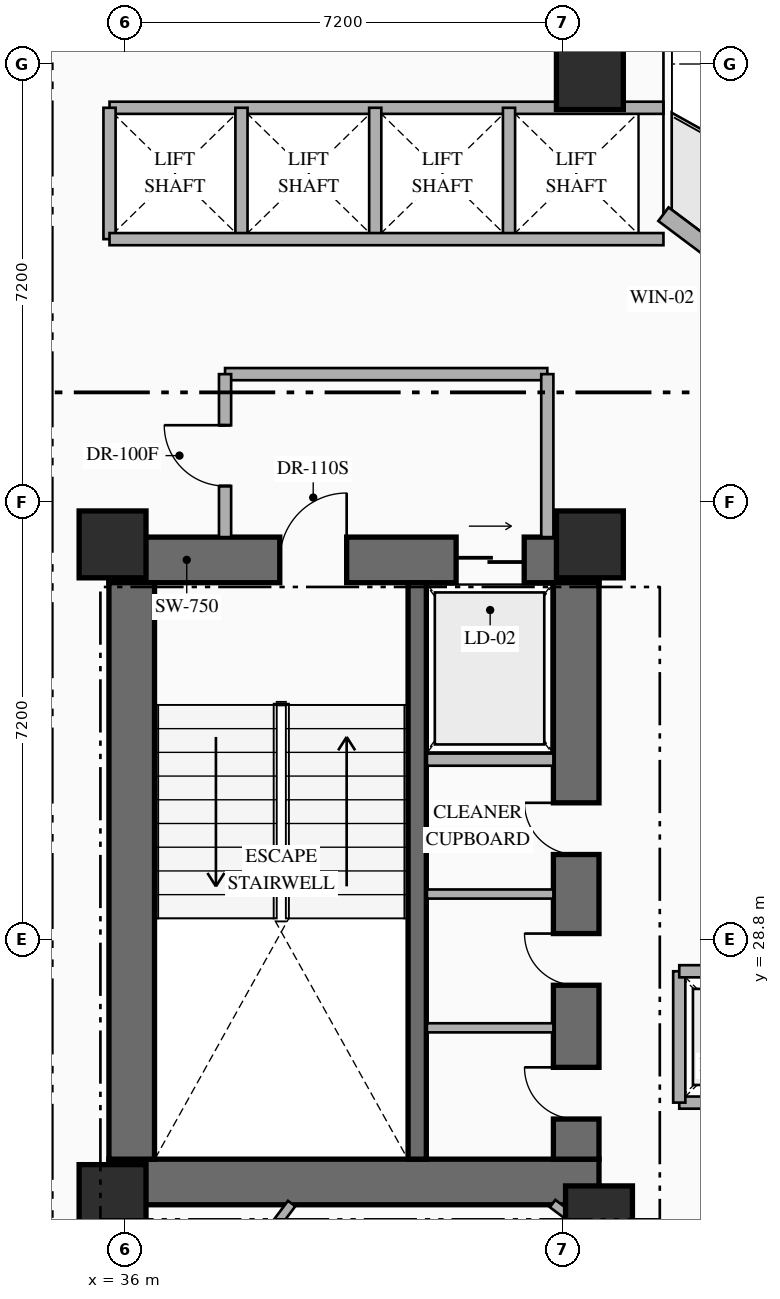
"""IFC4 building model, lengths in metres.
Left out: names, types, materials, properties, quantities, classifications, styles, units other than length and angle.
Written with IfcOpenShell. Run it as: python <this file> out.ifc"""

import sys

from ifc_helpers import new_model, si_unit, direction, frame, frame_2d, origin, origin_2d, place, context, subcontext, project, spatial, rectangle, extrude, element, fill, save


model = new_model("IFC4")
c1 = context("Model", 3, precision=1e-05, world=origin(), true_north=direction((0.0, 1.0)))
c2 = subcontext(c1, "Body", "Model", "MODEL_VIEW")
j1 = project(units=[si_unit("LENGTHUNIT", "METRE"), si_unit("PLANEANGLEUNIT", "RADIAN")], contexts=[c1])
p1 = place(None, origin())
s1 = spatial("IfcSite", under=j1, at=p1, CompositionType="ELEMENT")
p2 = place(p1, origin())
s2 = spatial("IfcBuilding", under=s1, at=p2, CompositionType="ELEMENT")
p3 = place(p2, frame((0.0, 0.0, 50.0)))
s3 = spatial("IfcBuildingStorey", under=s2, at=p3, CompositionType="ELEMENT", Elevation=50.0)
p4 = place(p3, frame((35.74, 24.815, 0.0), z_axis=(0.0, 0.0, 1.0), x_axis=(1.0, 0.0, 0.0)))
e1 = element("IfcWall", 1, at=p4, inside=s3, PredefinedType="SHEAR", context=c2, shape_type="SweptSolid", body=[
    extrude(rectangle(XDim=8.06, YDim=0.75, at=frame_2d((4.03, 0.0))), origin(), (0.0, 0.0, 1.0), 3.35),
])
p5 = place(p3, frame((35.74, 35.045, 0.0), z_axis=(0.0, 0.0, 1.0), x_axis=(1.0, 0.0, 0.0)))
e2 = element("IfcWall", 2, at=p5, inside=s3, PredefinedType="SHEAR", context=c2, shape_type="SweptSolid", body=[
    extrude(rectangle(XDim=8.06, YDim=0.75, at=frame_2d((4.03, 0.0))), origin(), (0.0, 0.0, 1.0), 3.35),
])
p6 = place(p5, frame((2.81, 0.0, 0.0)))
e3 = element("IfcOpeningElement", 3, at=p6, cuts=e2, PredefinedType="OPENING", context=c2, shape_type="SweptSolid", body=[
    extrude(rectangle(XDim=1.1, YDim=2.2, at=frame_2d((0.55, 1.1))), frame((0.0, 0.385, 0.0), z_axis=(0.0, -1.0, 0.0), x_axis=(1.0, 0.0, 0.0)), (0.0, 0.0, 1.0), 0.77),
])
p7 = place(p5, frame((5.71, 0.0, 0.0)))
e4 = element("IfcOpeningElement", 4, at=p7, cuts=e2, PredefinedType="OPENING", context=c2, shape_type="SweptSolid", body=[
    extrude(rectangle(XDim=1.12, YDim=2.15, at=frame_2d((0.56, 1.075))), frame((0.0, 0.385, 0.0), z_axis=(0.0, -1.0, 0.0), x_axis=(1.0, 0.0, 0.0)), (0.0, 0.0, 1.0), 0.77),
])
p8 = place(p3, frame((36.115, 25.19, 0.0), z_axis=(0.0, 0.0, 1.0), x_axis=(0.0, 1.0, 0.0)))
e5 = element("IfcWall", 5, at=p8, inside=s3, PredefinedType="SHEAR", context=c2, shape_type="SweptSolid", body=[
    extrude(rectangle(XDim=9.48, YDim=0.75, at=frame_2d((4.74, 0.0))), origin(), (0.0, 0.0, 1.0), 3.35),
])
p9 = place(p3, frame((43.425, 25.19, 0.0), z_axis=(0.0, 0.0, 1.0), x_axis=(0.0, 1.0, 0.0)))
e6 = element("IfcWall", 6, at=p9, inside=s3, PredefinedType="SHEAR", context=c2, shape_type="SweptSolid", body=[
    extrude(rectangle(XDim=9.48, YDim=0.75, at=frame_2d((4.74, 0.0))), origin(), (0.0, 0.0, 1.0), 3.35),
])
p10 = place(p9, frame((0.66, 0.0, 0.0)))
e7 = element("IfcOpeningElement", 7, at=p10, cuts=e6, PredefinedType="OPENING", context=c2, shape_type="SweptSolid", body=[
    extrude(rectangle(XDim=0.85, YDim=2.08, at=frame_2d((0.425, 1.04))), frame((0.0, 0.385, 0.0), z_axis=(0.0, -1.0, 0.0), x_axis=(1.0, 0.0, 0.0)), (0.0, 0.0, 1.0), 0.77),
])
p11 = place(p9, frame((2.86, 0.0, 0.0)))
e8 = element("IfcOpeningElement", 8, at=p11, cuts=e6, PredefinedType="OPENING", context=c2, shape_type="SweptSolid", body=[
    extrude(rectangle(XDim=0.85, YDim=2.08, at=frame_2d((0.425, 1.04))), frame((0.0, 0.385, 0.0), z_axis=(0.0, -1.0, 0.0), x_axis=(1.0, 0.0, 0.0)), (0.0, 0.0, 1.0), 0.77),
])
p12 = place(p9, frame((5.01, 0.0, 0.0)))
e9 = element("IfcOpeningElement", 9, at=p12, cuts=e6, PredefinedType="OPENING", context=c2, shape_type="SweptSolid", body=[
    extrude(rectangle(XDim=0.85, YDim=2.08, at=frame_2d((0.425, 1.04))), frame((0.0, 0.385, 0.0), z_axis=(0.0, -1.0, 0.0), x_axis=(1.0, 0.0, 0.0)), (0.0, 0.0, 1.0), 0.77),
])
p13 = place(p3, frame((40.81, 25.19, 0.0), z_axis=(0.0, 0.0, 1.0), x_axis=(0.0, 1.0, 0.0)))
e10 = element("IfcWall", 10, at=p13, inside=s3, PredefinedType="SHEAR", context=c2, shape_type="SweptSolid", body=[
    extrude(rectangle(XDim=9.48, YDim=0.3, at=frame_2d((4.74, 0.0))), origin(), (0.0, 0.0, 1.0), 3.35),
])
for number, where, z_axis, x_axis in (
    (11, (35.8, 24.55, 0.0), (0.0, 0.0, 1.0), (1.0, 0.0, 0.0)),
    (12, (43.8, 24.2, 0.0), (0.0, 0.0, 1.0), (1.0, 0.0, 0.0)),
    (13, (35.8, 35.3, 0.0), (0.0, 0.0, 1.0), (1.0, 0.0, 0.0)),
    (14, (43.65, 35.3, 0.0), (0.0, 0.0, 1.0), (1.0, 0.0, 0.0)),
    (15, (43.65, 43.0, 0.0), (0.0, 0.0, 1.0), (1.0, 0.0, 0.0)),
):
    element("IfcColumn", number, at=place(p3, frame(where, z_axis=z_axis, x_axis=x_axis)), inside=s3, PredefinedType="COLUMN", context=c2, shape_type="SweptSolid", body=[
        extrude(rectangle(XDim=1.1, YDim=1.1, at=origin_2d()), origin(), (0.0, 0.0, 1.0), 3.35),
    ])
p14 = place(p3, frame((44.86, 40.73, 0.0), z_axis=(0.0, 0.0, 1.0), x_axis=(0.800006902154, -0.599990797017, 0.0)))
e16 = element("IfcWall", 16, at=p14, inside=s3, PredefinedType="STANDARD", context=c2, shape_type="SweptSolid", body=[
    extrude(rectangle(XDim=29.712, YDim=0.28, at=frame_2d((14.856, 0.0))), origin(), (0.0, 0.0, 1.0), 3.13),
])
p15 = place(p14, frame((14.249, 0.0, 0.0)))
e17 = element("IfcOpeningElement", 17, at=p15, cuts=e16, PredefinedType="OPENING", context=c2, shape_type="SweptSolid", body=[
    extrude(rectangle(XDim=1.1, YDim=2.2, at=frame_2d((0.55, 1.1))), frame((0.0, 0.15, 0.0), z_axis=(0.0, -1.0, 0.0), x_axis=(1.0, 0.0, 0.0)), (0.0, 0.0, 1.0), 0.3),
])
p16 = place(p14, frame((1.612, 0.0, 0.85)))
e18 = element("IfcOpeningElement", 18, at=p16, cuts=e16, PredefinedType="OPENING", context=c2, shape_type="SweptSolid", body=[
    extrude(rectangle(XDim=1.4, YDim=1.8, at=frame_2d((0.7, 0.9))), frame((0.0, 0.15, 0.0), z_axis=(0.0, -1.0, 0.0), x_axis=(1.0, 0.0, 0.0)), (0.0, 0.0, 1.0), 0.3),
])
p17 = place(p14, frame((5.667, 0.0, 0.85)))
e19 = element("IfcOpeningElement", 19, at=p17, cuts=e16, PredefinedType="OPENING", context=c2, shape_type="SweptSolid", body=[
    extrude(rectangle(XDim=1.4, YDim=1.8, at=frame_2d((0.7, 0.9))), frame((0.0, 0.15, 0.0), z_axis=(0.0, -1.0, 0.0), x_axis=(1.0, 0.0, 0.0)), (0.0, 0.0, 1.0), 0.3),
])
p18 = place(p14, frame((9.912, 0.0, 0.85)))
e20 = element("IfcOpeningElement", 20, at=p18, cuts=e16, PredefinedType="OPENING", context=c2, shape_type="SweptSolid", body=[
    extrude(rectangle(XDim=1.4, YDim=1.8, at=frame_2d((0.7, 0.9))), frame((0.0, 0.15, 0.0), z_axis=(0.0, -1.0, 0.0), x_axis=(1.0, 0.0, 0.0)), (0.0, 0.0, 1.0), 0.3),
])
p19 = place(p14, frame((19.528, 0.0, 0.85)))
e21 = element("IfcOpeningElement", 21, at=p19, cuts=e16, PredefinedType="OPENING", context=c2, shape_type="SweptSolid", body=[
    extrude(rectangle(XDim=1.4, YDim=1.8, at=frame_2d((0.7, 0.9))), frame((0.0, 0.15, 0.0), z_axis=(0.0, -1.0, 0.0), x_axis=(1.0, 0.0, 0.0)), (0.0, 0.0, 1.0), 0.3),
])
p20 = place(p14, frame((23.451, 0.0, 0.85)))
e22 = element("IfcOpeningElement", 22, at=p20, cuts=e16, PredefinedType="OPENING", context=c2, shape_type="SweptSolid", body=[
    extrude(rectangle(XDim=1.4, YDim=1.8, at=frame_2d((0.7, 0.9))), frame((0.0, 0.15, 0.0), z_axis=(0.0, -1.0, 0.0), x_axis=(1.0, 0.0, 0.0)), (0.0, 0.0, 1.0), 0.3),
])
p21 = place(p14, frame((27.852, 0.0, 0.85)))
e23 = element("IfcOpeningElement", 23, at=p21, cuts=e16, PredefinedType="OPENING", context=c2, shape_type="SweptSolid", body=[
    extrude(rectangle(XDim=1.4, YDim=1.8, at=frame_2d((0.7, 0.9))), frame((0.0, 0.15, 0.0), z_axis=(0.0, -1.0, 0.0), x_axis=(1.0, 0.0, 0.0)), (0.0, 0.0, 1.0), 0.3),
])
p22 = place(p3, frame((40.97, 31.76, 0.0), z_axis=(0.0, 0.0, 1.0), x_axis=(1.0, 0.0, 0.0)))
e24 = element("IfcWall", 24, at=p22, inside=s3, PredefinedType="STANDARD", context=c2, shape_type="SweptSolid", body=[
    extrude(rectangle(XDim=2.08, YDim=0.2, at=frame_2d((1.04, 0.0))), origin(), (0.0, 0.0, 1.0), 3.13),
])
for number, where, z_axis, x_axis in (
    (25, (40.97, 27.35, 0.0), (0.0, 0.0, 1.0), (1.0, 0.0, 0.0)),
    (26, (40.97, 29.55, 0.0), (0.0, 0.0, 1.0), (1.0, 0.0, 0.0)),
):
    element("IfcWall", number, at=place(p3, frame(where, z_axis=z_axis, x_axis=x_axis)), inside=s3, PredefinedType="PARTITIONING", context=c2, shape_type="SweptSolid", body=[
        extrude(rectangle(XDim=2.08, YDim=0.15, at=frame_2d((1.04, 0.0))), origin(), (0.0, 0.0, 1.0), 3.13),
    ])
p23 = place(p3, frame((37.65, 38.1, 0.0), z_axis=(0.0, 0.0, 1.0), x_axis=(1.0, 0.0, 0.0)))
e27 = element("IfcWall", 27, at=p23, inside=s3, PredefinedType="STANDARD", context=c2, shape_type="SweptSolid", body=[
    extrude(rectangle(XDim=5.3, YDim=0.2, at=frame_2d((2.65, 0.0))), origin(), (0.0, 0.0, 1.0), 3.13),
])
p24 = place(p3, frame((42.95, 35.42, 0.0), z_axis=(0.0, 0.0, 1.0), x_axis=(0.0, 1.0, 0.0)))
e28 = element("IfcWall", 28, at=p24, inside=s3, PredefinedType="STANDARD", context=c2, shape_type="SweptSolid", body=[
    extrude(rectangle(XDim=2.68, YDim=0.2, at=frame_2d((1.34, 0.0))), origin(), (0.0, 0.0, 1.0), 3.13),
])
p25 = place(p3, frame((37.65, 35.42, 0.0), z_axis=(0.0, 0.0, 1.0), x_axis=(0.0, 1.0, 0.0)))
e29 = element("IfcWall", 29, at=p25, inside=s3, PredefinedType="STANDARD", context=c2, shape_type="SweptSolid", body=[
    extrude(rectangle(XDim=2.68, YDim=0.2, at=frame_2d((1.34, 0.0))), origin(), (0.0, 0.0, 1.0), 3.13),
])
p26 = place(p25, frame((0.84, 0.0, 0.0)))
e30 = element("IfcOpeningElement", 30, at=p26, cuts=e29, PredefinedType="OPENING", context=c2, shape_type="SweptSolid", body=[
    extrude(rectangle(XDim=1.0, YDim=2.2, at=frame_2d((0.5, 1.1))), frame((0.0, 0.11, 0.0), z_axis=(0.0, -1.0, 0.0), x_axis=(1.0, 0.0, 0.0)), (0.0, 0.0, 1.0), 0.22),
])
p27 = place(p3, frame((35.75, 42.48, 0.0), z_axis=(0.0, 0.0, 1.0), x_axis=(1.0, 0.0, 0.0)))
e31 = element("IfcWall", 31, at=p27, inside=s3, PredefinedType="STANDARD", context=c2, shape_type="SweptSolid", body=[
    extrude(rectangle(XDim=9.11, YDim=0.2, at=frame_2d((4.555, 0.0))), origin(), (0.0, 0.0, 1.0), 3.13),
])
for number, where, z_axis, x_axis in (
    (32, (35.75, 40.32, 0.0), (0.0, 0.0, 1.0), (0.0, 1.0, 0.0)),
    (33, (37.92, 40.32, 0.0), (0.0, 0.0, 1.0), (0.0, 1.0, 0.0)),
    (34, (40.12, 40.32, 0.0), (0.0, 0.0, 1.0), (0.0, 1.0, 0.0)),
    (35, (42.32, 40.32, 0.0), (0.0, 0.0, 1.0), (0.0, 1.0, 0.0)),
):
    element("IfcWall", number, at=place(p3, frame(where, z_axis=z_axis, x_axis=x_axis)), inside=s3, PredefinedType="STANDARD", context=c2, shape_type="SweptSolid", body=[
        extrude(rectangle(XDim=2.16, YDim=0.2, at=frame_2d((1.08, 0.0))), origin(), (0.0, 0.0, 1.0), 3.13),
    ])
p28 = place(p3, frame((35.75, 40.32, 0.0), z_axis=(0.0, 0.0, 1.0), x_axis=(1.0, 0.0, 0.0)))
e36 = element("IfcWall", 36, at=p28, inside=s3, PredefinedType="STANDARD", context=c2, shape_type="SweptSolid", body=[
    extrude(rectangle(XDim=9.11, YDim=0.2, at=frame_2d((4.555, 0.0))), origin(), (0.0, 0.0, 1.0), 3.13),
])
p29 = place(p3, frame((45.12, 26.12, 0.0), z_axis=(0.0, 0.0, 1.0), x_axis=(1.0, 0.0, 0.0)))
e37 = element("IfcWall", 37, at=p29, inside=s3, PredefinedType="STANDARD", context=c2, shape_type="SweptSolid", body=[
    extrude(rectangle(XDim=4.4, YDim=0.2, at=frame_2d((2.2, 0.0))), origin(), (0.0, 0.0, 1.0), 3.13),
])
p30 = place(p3, frame((45.12, 26.12, 0.0), z_axis=(0.0, 0.0, 1.0), x_axis=(0.0, 1.0, 0.0)))
e38 = element("IfcWall", 38, at=p30, inside=s3, PredefinedType="STANDARD", context=c2, shape_type="SweptSolid", body=[
    extrude(rectangle(XDim=2.16, YDim=0.2, at=frame_2d((1.08, 0.0))), origin(), (0.0, 0.0, 1.0), 3.13),
])
p31 = place(p3, frame((45.12, 28.28, 0.0), z_axis=(0.0, 0.0, 1.0), x_axis=(1.0, 0.0, 0.0)))
e39 = element("IfcWall", 39, at=p31, inside=s3, PredefinedType="STANDARD", context=c2, shape_type="SweptSolid", body=[
    extrude(rectangle(XDim=4.4, YDim=0.2, at=frame_2d((2.2, 0.0))), origin(), (0.0, 0.0, 1.0), 3.13),
])
p32 = place(p31, frame((0.56, 0.0, 0.0)))
e40 = element("IfcOpeningElement", 40, at=p32, cuts=e39, PredefinedType="OPENING", context=c2, shape_type="SweptSolid", body=[
    extrude(rectangle(XDim=1.08, YDim=2.15, at=frame_2d((0.54, 1.075))), frame((0.0, 0.11, 0.0), z_axis=(0.0, -1.0, 0.0), x_axis=(1.0, 0.0, 0.0)), (0.0, 0.0, 1.0), 0.22),
])
p33 = place(p31, frame((2.76, 0.0, 0.0)))
e41 = element("IfcOpeningElement", 41, at=p33, cuts=e39, PredefinedType="OPENING", context=c2, shape_type="SweptSolid", body=[
    extrude(rectangle(XDim=1.08, YDim=2.15, at=frame_2d((0.54, 1.075))), frame((0.0, 0.11, 0.0), z_axis=(0.0, -1.0, 0.0), x_axis=(1.0, 0.0, 0.0)), (0.0, 0.0, 1.0), 0.22),
])
p34 = place(p3, frame((43.037, 24.46, 0.0), z_axis=(0.0, 0.0, 1.0), x_axis=(0.799971872363, -0.600037501685, 0.0)))
e42 = element("IfcWall", 42, at=p34, inside=s3, PredefinedType="PARTITIONING", context=c2, shape_type="SweptSolid", body=[
    extrude(rectangle(XDim=4.167, YDim=0.15, at=frame_2d((2.083, 0.0))), origin(), (0.0, 0.0, 1.0), 2.425),
])
p35 = place(p34, frame((2.468, 0.0, 0.0)))
e43 = element("IfcOpeningElement", 43, at=p35, cuts=e42, PredefinedType="OPENING", context=c2, shape_type="SweptSolid", body=[
    extrude(rectangle(XDim=0.95, YDim=2.15, at=frame_2d((0.475, 1.075))), frame((0.0, 0.085, 0.0), z_axis=(0.0, -1.0, 0.0), x_axis=(1.0, 0.0, 0.0)), (0.0, 0.0, 1.0), 0.17),
])
p36 = place(p3, frame((33.384, 17.312, 0.0), z_axis=(0.0, 0.0, 1.0), x_axis=(0.600008743659, 0.799993442181, 0.0)))
e44 = element("IfcWall", 44, at=p36, inside=s3, PredefinedType="PARTITIONING", context=c2, shape_type="SweptSolid", body=[
    extrude(rectangle(XDim=8.935, YDim=0.15, at=frame_2d((4.468, 0.0))), origin(), (0.0, 0.0, 1.0), 3.13),
])
p37 = place(p6, origin())
e45 = element("IfcDoor", 45, at=p37, inside=s3, OperationType="SINGLE_SWING_RIGHT", PredefinedType="DOOR", context=c2, shape_type="SweptSolid", body=[
    extrude(rectangle(XDim=1.1, YDim=2.2, at=frame_2d((0.55, 1.1))), frame((0.0, 0.025, 0.0), z_axis=(0.0, -1.0, 0.0), x_axis=(1.0, 0.0, 0.0)), (0.0, 0.0, 1.0), 0.05),
])
fill(e3, e45)
p38 = place(p7, origin())
e46 = element("IfcDoor", 46, at=p38, inside=s3, OperationType="SLIDING_TO_RIGHT", PredefinedType="USERDEFINED", context=c2, shape_type="SweptSolid", body=[
    extrude(rectangle(XDim=1.12, YDim=2.15, at=frame_2d((0.56, 1.075))), frame((0.0, 0.025, 0.0), z_axis=(0.0, -1.0, 0.0), x_axis=(1.0, 0.0, 0.0)), (0.0, 0.0, 1.0), 0.05),
])
fill(e4, e46)
p39 = place(p10, origin())
e47 = element("IfcDoor", 47, at=p39, inside=s3, OperationType="SINGLE_SWING_RIGHT", PredefinedType="DOOR", context=c2, shape_type="SweptSolid", body=[
    extrude(rectangle(XDim=0.85, YDim=2.08, at=frame_2d((0.425, 1.04))), frame((0.0, 0.025, 0.0), z_axis=(0.0, -1.0, 0.0), x_axis=(1.0, 0.0, 0.0)), (0.0, 0.0, 1.0), 0.05),
])
fill(e7, e47)
p40 = place(p11, origin())
e48 = element("IfcDoor", 48, at=p40, inside=s3, OperationType="SINGLE_SWING_RIGHT", PredefinedType="DOOR", context=c2, shape_type="SweptSolid", body=[
    extrude(rectangle(XDim=0.85, YDim=2.08, at=frame_2d((0.425, 1.04))), frame((0.0, 0.025, 0.0), z_axis=(0.0, -1.0, 0.0), x_axis=(1.0, 0.0, 0.0)), (0.0, 0.0, 1.0), 0.05),
])
fill(e8, e48)
p41 = place(p12, origin())
e49 = element("IfcDoor", 49, at=p41, inside=s3, OperationType="SINGLE_SWING_RIGHT", PredefinedType="DOOR", context=c2, shape_type="SweptSolid", body=[
    extrude(rectangle(XDim=0.85, YDim=2.08, at=frame_2d((0.425, 1.04))), frame((0.0, 0.025, 0.0), z_axis=(0.0, -1.0, 0.0), x_axis=(1.0, 0.0, 0.0)), (0.0, 0.0, 1.0), 0.05),
])
fill(e9, e49)
p42 = place(p26, origin())
e50 = element("IfcDoor", 50, at=p42, inside=s3, OperationType="SINGLE_SWING_RIGHT", PredefinedType="DOOR", context=c2, shape_type="SweptSolid", body=[
    extrude(rectangle(XDim=1.0, YDim=2.2, at=frame_2d((0.5, 1.1))), frame((0.0, 0.025, 0.0), z_axis=(0.0, -1.0, 0.0), x_axis=(1.0, 0.0, 0.0)), (0.0, 0.0, 1.0), 0.05),
])
fill(e30, e50)
save(model, sys.argv[1])
